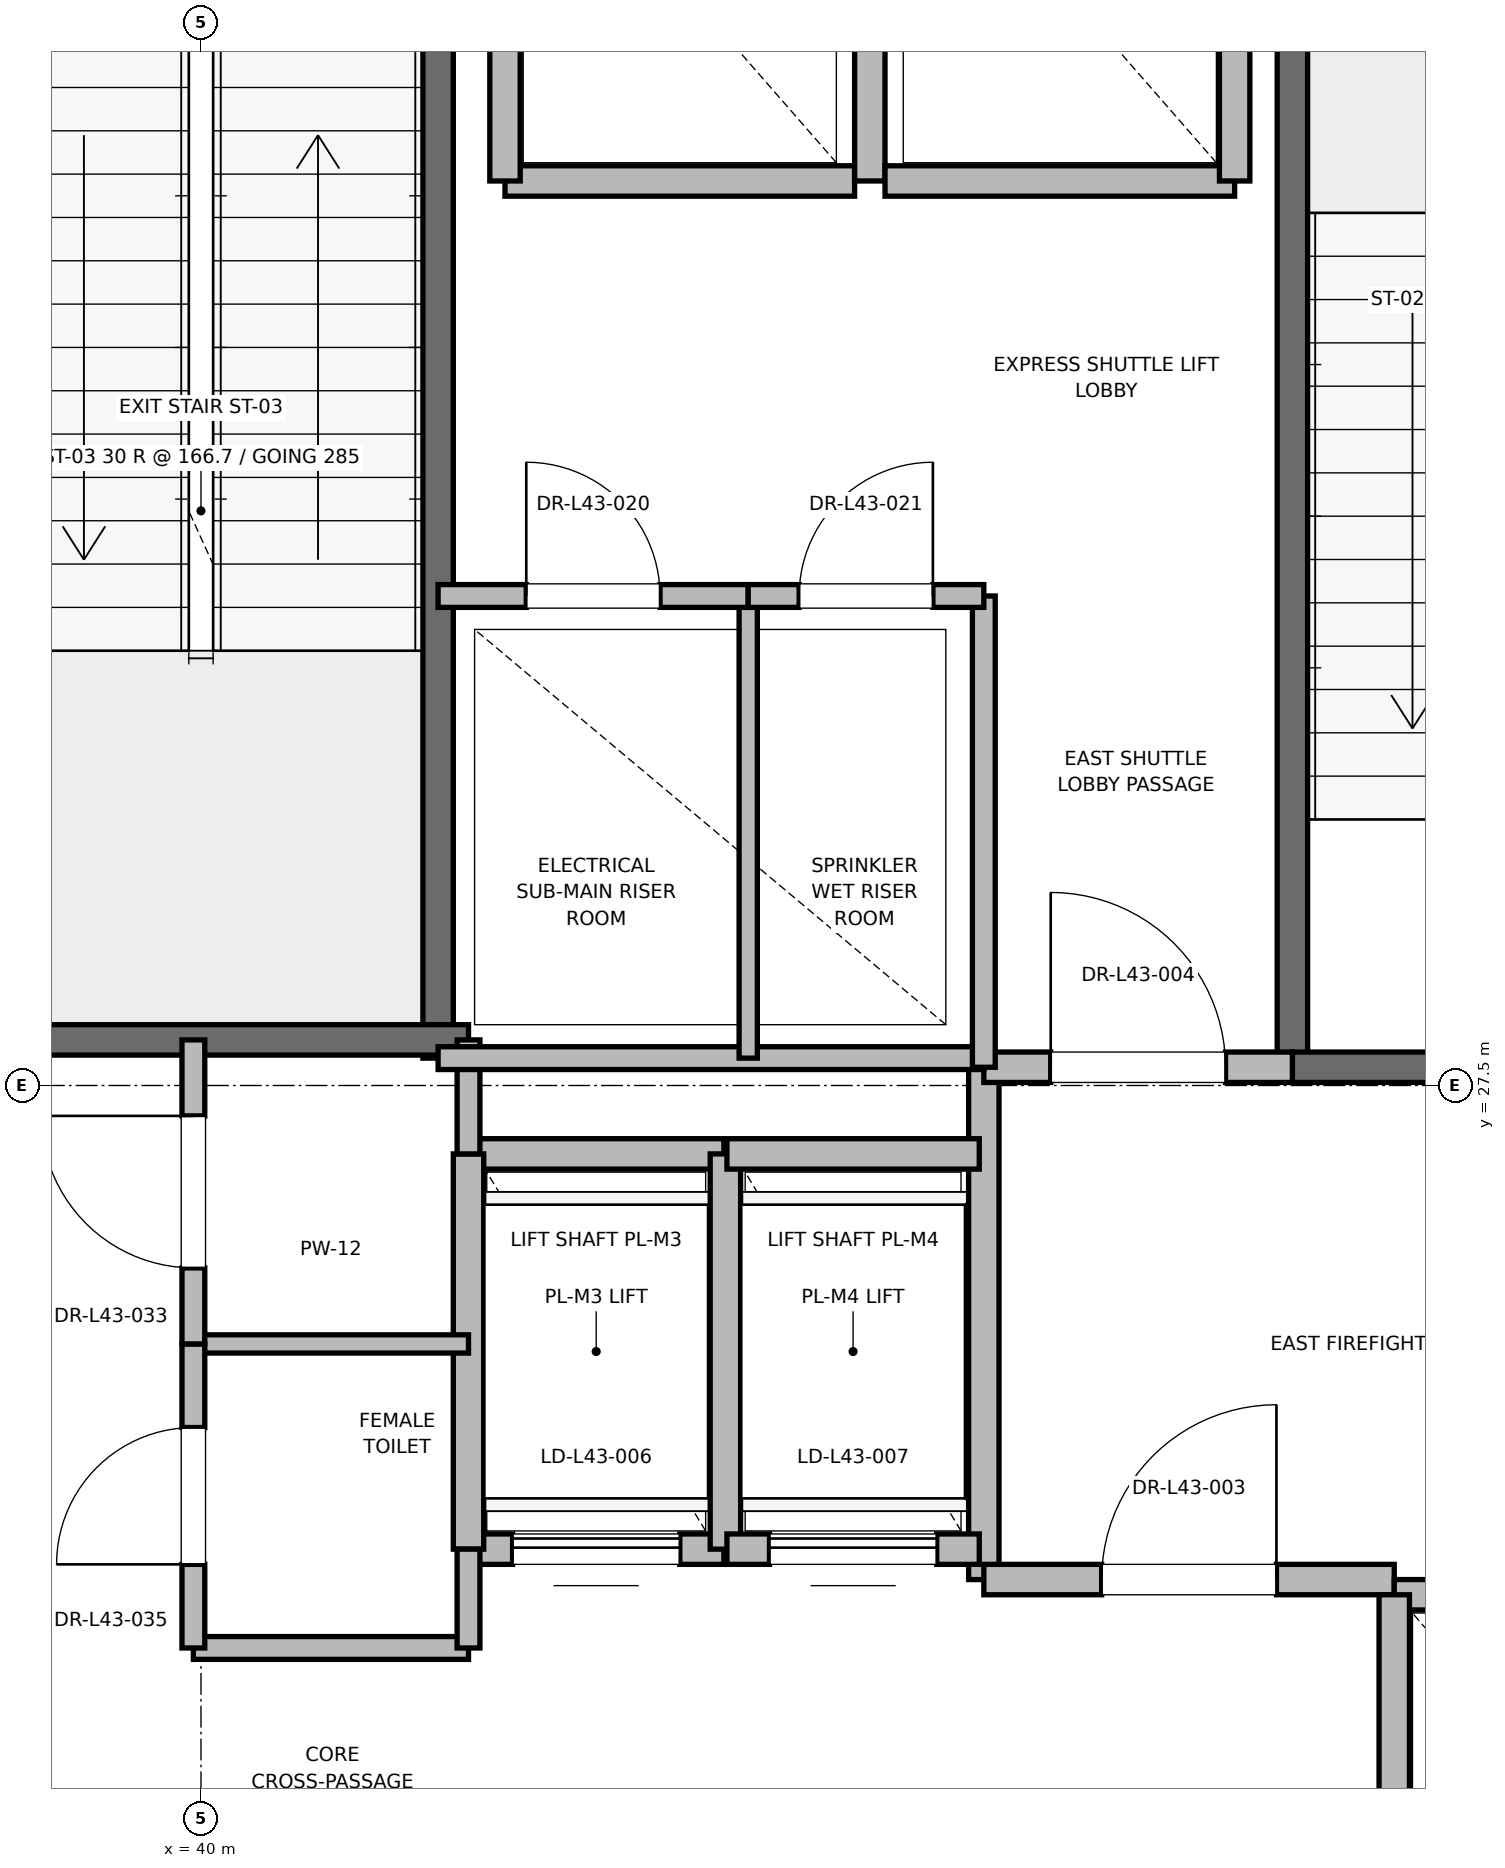
"""IFC4 building model, lengths in metres.
Left out: names, types, materials, properties, quantities, classifications, styles, units other than length and angle.
Written with IfcOpenShell. Run it as: python <this file> out.ifc"""

import sys

from ifc_helpers import new_model, si_unit, direction, frame, frame_2d, origin, place, context, subcontext, project, spatial, rectangle, extrude, element, fill, save


model = new_model("IFC4")
c1 = context("Model", 3, precision=1e-05, world=origin(), true_north=direction((0.0, 1.0)))
c2 = subcontext(c1, "Body", "Model", "MODEL_VIEW")
j1 = project(units=[si_unit("LENGTHUNIT", "METRE"), si_unit("PLANEANGLEUNIT", "RADIAN")], contexts=[c1])
p1 = place(None, origin())
s1 = spatial("IfcSite", under=j1, at=p1, CompositionType="ELEMENT")
p2 = place(p1, origin())
s2 = spatial("IfcBuilding", under=s1, at=p2, CompositionType="ELEMENT")
p3 = place(p2, frame((0.0, 0.0, 184.4)))
s3 = spatial("IfcBuildingStorey", under=s2, at=p3, CompositionType="ELEMENT", Elevation=184.4)
p4 = place(p3, frame((47.18, 27.62, 0.0), z_axis=(0.0, 0.0, 1.0), x_axis=(0.0, 1.0, 0.0)))
e1 = element("IfcWall", 1, at=p4, inside=s3, PredefinedType="SOLIDWALL", context=c2, shape_type="SweptSolid", body=[
    extrude(rectangle(XDim=8.18, YDim=0.2, at=frame_2d((4.09, 0.0))), origin(), (0.0, 0.0, 1.0), 4.7),
])
p5 = place(p3, frame((47.18, 27.62, 0.0), z_axis=(0.0, 0.0, 1.0), x_axis=(1.0, 0.0, 0.0)))
e2 = element("IfcWall", 2, at=p5, inside=s3, PredefinedType="SOLIDWALL", context=c2, shape_type="SweptSolid", body=[
    extrude(rectangle(XDim=3.12, YDim=0.2, at=frame_2d((1.56, 0.0))), origin(), (0.0, 0.0, 1.0), 4.7),
])
p6 = place(p5, frame((1.01, 0.0, 0.0)))
e3 = element("IfcOpeningElement", 3, at=p6, cuts=e2, PredefinedType="OPENING", context=c2, shape_type="SweptSolid", body=[
    extrude(rectangle(XDim=1.1, YDim=2.15, at=frame_2d((0.55, 1.075))), frame((0.0, 0.1, 0.0), z_axis=(0.0, -1.0, 0.0), x_axis=(1.0, 0.0, 0.0)), (0.0, 0.0, 1.0), 0.2),
])
p7 = place(p3, frame((41.56, 27.68, 0.0), z_axis=(0.0, 0.0, 1.0), x_axis=(0.0, 1.0, 0.0)))
e4 = element("IfcWall", 4, at=p7, inside=s3, PredefinedType="SOLIDWALL", context=c2, shape_type="SweptSolid", body=[
    extrude(rectangle(XDim=8.57, YDim=0.2, at=frame_2d((4.285, 0.0))), origin(), (0.0, 0.0, 1.0), 4.7),
])
p8 = place(p3, frame((38.44, 27.8, 0.0), z_axis=(0.0, 0.0, 1.0), x_axis=(1.0, 0.0, 0.0)))
e5 = element("IfcWall", 5, at=p8, inside=s3, PredefinedType="SOLIDWALL", context=c2, shape_type="SweptSolid", body=[
    extrude(rectangle(XDim=3.32, YDim=0.2, at=frame_2d((1.66, 0.0))), origin(), (0.0, 0.0, 1.0), 4.7),
])
p9 = place(p3, frame((45.15, 24.25, 0.0), z_axis=(0.0, 0.0, 1.0), x_axis=(0.0, 1.0, 0.0)))
e6 = element("IfcWall", 6, at=p9, inside=s3, PredefinedType="PARTITIONING", context=c2, shape_type="SweptSolid", body=[
    extrude(rectangle(XDim=3.37, YDim=0.2, at=frame_2d((1.685, 0.0))), origin(), (0.0, 0.0, 1.0), 4.7),
])
p10 = place(p3, frame((45.15, 24.25, 0.0), z_axis=(0.0, 0.0, 1.0), x_axis=(1.0, 0.0, 0.0)))
e7 = element("IfcWall", 7, at=p10, inside=s3, PredefinedType="PARTITIONING", context=c2, shape_type="SweptSolid", body=[
    extrude(rectangle(XDim=2.7, YDim=0.2, at=frame_2d((1.35, 0.0))), origin(), (0.0, 0.0, 1.0), 4.7),
])
p11 = place(p10, frame((0.775, 0.0, 0.0)))
e8 = element("IfcOpeningElement", 8, at=p11, cuts=e7, PredefinedType="OPENING", context=c2, shape_type="SweptSolid", body=[
    extrude(rectangle(XDim=1.15, YDim=2.2, at=frame_2d((0.575, 1.1))), frame((0.0, 0.1, 0.0), z_axis=(0.0, -1.0, 0.0), x_axis=(1.0, 0.0, 0.0)), (0.0, 0.0, 1.0), 0.2),
])
p12 = place(p3, frame((45.15, 27.62, 0.0), z_axis=(0.0, 0.0, 1.0), x_axis=(1.0, 0.0, 0.0)))
e9 = element("IfcWall", 9, at=p12, inside=s3, PredefinedType="PARTITIONING", context=c2, shape_type="SweptSolid", body=[
    extrude(rectangle(XDim=2.03, YDim=0.2, at=frame_2d((1.015, 0.0))), origin(), (0.0, 0.0, 1.0), 4.7),
])
p13 = place(p12, frame((0.44, 0.0, 0.0)))
e10 = element("IfcOpeningElement", 10, at=p13, cuts=e9, PredefinedType="OPENING", context=c2, shape_type="SweptSolid", body=[
    extrude(rectangle(XDim=1.15, YDim=2.2, at=frame_2d((0.575, 1.1))), frame((0.0, 0.1, 0.0), z_axis=(0.0, -1.0, 0.0), x_axis=(1.0, 0.0, 0.0)), (0.0, 0.0, 1.0), 0.2),
])
p14 = place(p3, frame((50.45, 24.15, 0.0), z_axis=(0.0, 0.0, 1.0), x_axis=(-1.0, 0.0, 0.0)))
e11 = element("IfcWall", 11, at=p14, inside=s3, PredefinedType="SOLIDWALL", context=c2, shape_type="SweptSolid", body=[
    extrude(rectangle(XDim=2.6, YDim=0.2, at=frame_2d((1.3, 0.0))), origin(), (0.0, 0.0, 1.0), 3.68),
])
p15 = place(p14, frame((0.75, 0.0, 0.0)))
e12 = element("IfcOpeningElement", 12, at=p15, cuts=e11, PredefinedType="OPENING", context=c2, shape_type="SweptSolid", body=[
    extrude(rectangle(XDim=1.1, YDim=2.2, at=frame_2d((0.55, 1.1))), frame((0.0, 0.1, 0.0), z_axis=(0.0, -1.0, 0.0), x_axis=(1.0, 0.0, 0.0)), (0.0, 0.0, 1.0), 0.2),
])
p16 = place(p3, frame((47.85, 24.15, 0.0), z_axis=(0.0, 0.0, 1.0), x_axis=(0.0, -1.0, 0.0)))
e13 = element("IfcWall", 13, at=p16, inside=s3, PredefinedType="SOLIDWALL", context=c2, shape_type="SweptSolid", body=[
    extrude(rectangle(XDim=3.0, YDim=0.2, at=frame_2d((1.5, 0.0))), origin(), (0.0, 0.0, 1.0), 4.7),
])
p17 = place(p3, frame((41.76, 24.45, 0.0), z_axis=(0.0, 0.0, 1.0), x_axis=(1.0, 0.0, 0.0)))
e14 = element("IfcWall", 14, at=p17, inside=s3, PredefinedType="SOLIDWALL", context=c2, shape_type="SweptSolid", body=[
    extrude(rectangle(XDim=1.68, YDim=0.2, at=frame_2d((0.84, 0.0))), origin(), (0.0, 0.0, 1.0), 4.7),
])
p18 = place(p17, frame((0.29, 0.0, 0.0)))
e15 = element("IfcOpeningElement", 15, at=p18, cuts=e14, PredefinedType="OPENING", context=c2, shape_type="SweptSolid", body=[
    extrude(rectangle(XDim=1.1, YDim=2.2, at=frame_2d((0.55, 1.1))), frame((0.0, 0.1, 0.0), z_axis=(0.0, -1.0, 0.0), x_axis=(1.0, 0.0, 0.0)), (0.0, 0.0, 1.0), 0.2),
])
p19 = place(p3, frame((43.44, 27.05, 0.0), z_axis=(0.0, 0.0, 1.0), x_axis=(-1.0, 0.0, 0.0)))
e16 = element("IfcWall", 16, at=p19, inside=s3, PredefinedType="SOLIDWALL", context=c2, shape_type="SweptSolid", body=[
    extrude(rectangle(XDim=1.68, YDim=0.2, at=frame_2d((0.84, 0.0))), origin(), (0.0, 0.0, 1.0), 4.7),
])
for number, where, z_axis, x_axis in (
    (17, (41.76, 27.05, 0.0), (0.0, 0.0, 1.0), (0.0, -1.0, 0.0)),
    (18, (43.45, 24.45, 0.0), (0.0, 0.0, 1.0), (0.0, 1.0, 0.0)),
):
    element("IfcWall", number, at=place(p3, frame(where, z_axis=z_axis, x_axis=x_axis)), inside=s3, PredefinedType="SOLIDWALL", context=c2, shape_type="SweptSolid", body=[
        extrude(rectangle(XDim=2.6, YDim=0.2, at=frame_2d((1.3, 0.0))), origin(), (0.0, 0.0, 1.0), 4.7),
    ])
p20 = place(p3, frame((43.46, 24.45, 0.0), z_axis=(0.0, 0.0, 1.0), x_axis=(1.0, 0.0, 0.0)))
e19 = element("IfcWall", 19, at=p20, inside=s3, PredefinedType="SOLIDWALL", context=c2, shape_type="SweptSolid", body=[
    extrude(rectangle(XDim=1.66, YDim=0.2, at=frame_2d((0.83, 0.0))), origin(), (0.0, 0.0, 1.0), 4.7),
])
p21 = place(p20, frame((0.28, 0.0, 0.0)))
e20 = element("IfcOpeningElement", 20, at=p21, cuts=e19, PredefinedType="OPENING", context=c2, shape_type="SweptSolid", body=[
    extrude(rectangle(XDim=1.1, YDim=2.2, at=frame_2d((0.55, 1.1))), frame((0.0, 0.1, 0.0), z_axis=(0.0, -1.0, 0.0), x_axis=(1.0, 0.0, 0.0)), (0.0, 0.0, 1.0), 0.2),
])
p22 = place(p3, frame((45.12, 27.05, 0.0), z_axis=(0.0, 0.0, 1.0), x_axis=(-1.0, 0.0, 0.0)))
e21 = element("IfcWall", 21, at=p22, inside=s3, PredefinedType="SOLIDWALL", context=c2, shape_type="SweptSolid", body=[
    extrude(rectangle(XDim=1.66, YDim=0.2, at=frame_2d((0.83, 0.0))), origin(), (0.0, 0.0, 1.0), 4.7),
])
p23 = place(p3, frame((42.0, 33.45, 0.0), z_axis=(0.0, 0.0, 1.0), x_axis=(1.0, 0.0, 0.0)))
e22 = element("IfcWall", 22, at=p23, inside=s3, PredefinedType="SOLIDWALL", context=c2, shape_type="SweptSolid", body=[
    extrude(rectangle(XDim=2.3, YDim=0.2, at=frame_2d((1.15, 0.0))), origin(), (0.0, 0.0, 1.0), 4.7),
])
for number, where, z_axis, x_axis in (
    (23, (42.0, 36.05, 0.0), (0.0, 0.0, 1.0), (0.0, -1.0, 0.0)),
    (24, (44.4, 33.45, 0.0), (0.0, 0.0, 1.0), (0.0, 1.0, 0.0)),
):
    element("IfcWall", number, at=place(p3, frame(where, z_axis=z_axis, x_axis=x_axis)), inside=s3, PredefinedType="SOLIDWALL", context=c2, shape_type="SweptSolid", body=[
        extrude(rectangle(XDim=2.6, YDim=0.2, at=frame_2d((1.3, 0.0))), origin(), (0.0, 0.0, 1.0), 3.68),
    ])
p24 = place(p3, frame((44.5, 33.45, 0.0), z_axis=(0.0, 0.0, 1.0), x_axis=(1.0, 0.0, 0.0)))
e25 = element("IfcWall", 25, at=p24, inside=s3, PredefinedType="SOLIDWALL", context=c2, shape_type="SweptSolid", body=[
    extrude(rectangle(XDim=2.3, YDim=0.2, at=frame_2d((1.15, 0.0))), origin(), (0.0, 0.0, 1.0), 4.7),
])
p25 = place(p3, frame((46.8, 33.45, 0.0), z_axis=(0.0, 0.0, 1.0), x_axis=(0.0, 1.0, 0.0)))
e26 = element("IfcWall", 26, at=p25, inside=s3, PredefinedType="SOLIDWALL", context=c2, shape_type="SweptSolid", body=[
    extrude(rectangle(XDim=2.6, YDim=0.2, at=frame_2d((1.3, 0.0))), origin(), (0.0, 0.0, 1.0), 4.7),
])
p26 = place(p3, frame((39.95, 23.8, 0.0), z_axis=(0.0, 0.0, 1.0), x_axis=(1.0, 0.0, 0.0)))
e27 = element("IfcWall", 27, at=p26, inside=s3, PredefinedType="PARTITIONING", context=c2, shape_type="SweptSolid", body=[
    extrude(rectangle(XDim=1.81, YDim=0.15, at=frame_2d((0.905, 0.0))), origin(), (0.0, 0.0, 1.0), 2.85),
])
p27 = place(p3, frame((39.95, 25.8, 0.0), z_axis=(0.0, 0.0, 1.0), x_axis=(1.0, 0.0, 0.0)))
e28 = element("IfcWall", 28, at=p27, inside=s3, PredefinedType="PARTITIONING", context=c2, shape_type="SweptSolid", body=[
    extrude(rectangle(XDim=1.81, YDim=0.12, at=frame_2d((0.905, 0.0))), origin(), (0.0, 0.0, 1.0), 2.85),
])
p28 = place(p3, frame((41.76, 23.8, 0.0), z_axis=(0.0, 0.0, 1.0), x_axis=(0.0, 1.0, 0.0)))
e29 = element("IfcWall", 29, at=p28, inside=s3, PredefinedType="PARTITIONING", context=c2, shape_type="SweptSolid", body=[
    extrude(rectangle(XDim=0.65, YDim=0.15, at=frame_2d((0.325, 0.0))), origin(), (0.0, 0.0, 1.0), 2.85),
])
p29 = place(p3, frame((41.76, 27.05, 0.0), z_axis=(0.0, 0.0, 1.0), x_axis=(0.0, 1.0, 0.0)))
e30 = element("IfcWall", 30, at=p29, inside=s3, PredefinedType="PARTITIONING", context=c2, shape_type="SweptSolid", body=[
    extrude(rectangle(XDim=0.75, YDim=0.15, at=frame_2d((0.375, 0.0))), origin(), (0.0, 0.0, 1.0), 2.85),
])
p30 = place(p3, frame((39.95, 23.8, 0.0), z_axis=(0.0, 0.0, 1.0), x_axis=(0.0, 1.0, 0.0)))
e31 = element("IfcWall", 31, at=p30, inside=s3, PredefinedType="PARTITIONING", context=c2, shape_type="SweptSolid", body=[
    extrude(rectangle(XDim=2.0, YDim=0.15, at=frame_2d((1.0, 0.0))), origin(), (0.0, 0.0, 1.0), 2.85),
])
p31 = place(p30, frame((0.55, 0.0, 0.0)))
e32 = element("IfcOpeningElement", 32, at=p31, cuts=e31, PredefinedType="OPENING", context=c2, shape_type="SweptSolid", body=[
    extrude(rectangle(XDim=0.9, YDim=2.1, at=frame_2d((0.45, 1.05))), frame((0.0, 0.075, 0.0), z_axis=(0.0, -1.0, 0.0), x_axis=(1.0, 0.0, 0.0)), (0.0, 0.0, 1.0), 0.15),
])
p32 = place(p3, frame((39.95, 25.8, 0.0), z_axis=(0.0, 0.0, 1.0), x_axis=(0.0, 1.0, 0.0)))
e33 = element("IfcWall", 33, at=p32, inside=s3, PredefinedType="PARTITIONING", context=c2, shape_type="SweptSolid", body=[
    extrude(rectangle(XDim=2.0, YDim=0.15, at=frame_2d((1.0, 0.0))), origin(), (0.0, 0.0, 1.0), 2.85),
])
p33 = place(p32, frame((0.5, 0.0, 0.0)))
e34 = element("IfcOpeningElement", 34, at=p33, cuts=e33, PredefinedType="OPENING", context=c2, shape_type="SweptSolid", body=[
    extrude(rectangle(XDim=1.0, YDim=2.15, at=frame_2d((0.5, 1.075))), frame((0.0, 0.075, 0.0), z_axis=(0.0, -1.0, 0.0), x_axis=(1.0, 0.0, 0.0)), (0.0, 0.0, 1.0), 0.15),
])
p34 = place(p3, frame((41.56, 27.68, 0.0), z_axis=(0.0, 0.0, 1.0), x_axis=(1.0, 0.0, 0.0)))
e35 = element("IfcWall", 35, at=p34, inside=s3, PredefinedType="PARTITIONING", context=c2, shape_type="SweptSolid", body=[
    extrude(rectangle(XDim=3.59, YDim=0.15, at=frame_2d((1.795, 0.0))), origin(), (0.0, 0.0, 1.0), 2.85),
])
p35 = place(p3, frame((45.15, 27.62, 0.0), z_axis=(0.0, 0.0, 1.0), x_axis=(0.0, 1.0, 0.0)))
e36 = element("IfcWall", 36, at=p35, inside=s3, PredefinedType="PARTITIONING", context=c2, shape_type="SweptSolid", body=[
    extrude(rectangle(XDim=3.1, YDim=0.15, at=frame_2d((1.55, 0.0))), origin(), (0.0, 0.0, 1.0), 2.85),
])
p36 = place(p3, frame((43.6, 27.68, 0.0), z_axis=(0.0, 0.0, 1.0), x_axis=(0.0, 1.0, 0.0)))
e37 = element("IfcWall", 37, at=p36, inside=s3, PredefinedType="PARTITIONING", context=c2, shape_type="SweptSolid", body=[
    extrude(rectangle(XDim=3.04, YDim=0.12, at=frame_2d((1.52, 0.0))), origin(), (0.0, 0.0, 1.0), 2.85),
])
p37 = place(p3, frame((41.56, 30.72, 0.0), z_axis=(0.0, 0.0, 1.0), x_axis=(1.0, 0.0, 0.0)))
e38 = element("IfcWall", 38, at=p37, inside=s3, PredefinedType="PARTITIONING", context=c2, shape_type="SweptSolid", body=[
    extrude(rectangle(XDim=2.04, YDim=0.15, at=frame_2d((1.02, 0.0))), origin(), (0.0, 0.0, 1.0), 2.85),
])
p38 = place(p37, frame((0.58, 0.0, 0.0)))
e39 = element("IfcOpeningElement", 39, at=p38, cuts=e38, PredefinedType="OPENING", context=c2, shape_type="SweptSolid", body=[
    extrude(rectangle(XDim=0.88, YDim=2.1, at=frame_2d((0.44, 1.05))), frame((0.0, 0.075, 0.0), z_axis=(0.0, -1.0, 0.0), x_axis=(1.0, 0.0, 0.0)), (0.0, 0.0, 1.0), 0.15),
])
p39 = place(p3, frame((43.6, 30.72, 0.0), z_axis=(0.0, 0.0, 1.0), x_axis=(1.0, 0.0, 0.0)))
e40 = element("IfcWall", 40, at=p39, inside=s3, PredefinedType="PARTITIONING", context=c2, shape_type="SweptSolid", body=[
    extrude(rectangle(XDim=1.55, YDim=0.15, at=frame_2d((0.775, 0.0))), origin(), (0.0, 0.0, 1.0), 2.85),
])
p40 = place(p39, frame((0.335, 0.0, 0.0)))
e41 = element("IfcOpeningElement", 41, at=p40, cuts=e40, PredefinedType="OPENING", context=c2, shape_type="SweptSolid", body=[
    extrude(rectangle(XDim=0.88, YDim=2.1, at=frame_2d((0.44, 1.05))), frame((0.0, 0.075, 0.0), z_axis=(0.0, -1.0, 0.0), x_axis=(1.0, 0.0, 0.0)), (0.0, 0.0, 1.0), 0.15),
])
p41 = place(p11, origin())
e42 = element("IfcDoor", 42, at=p41, inside=s3, OperationType="SINGLE_SWING_RIGHT", PredefinedType="DOOR", context=c2, shape_type="SweptSolid", body=[
    extrude(rectangle(XDim=1.15, YDim=2.2, at=frame_2d((0.575, 1.1))), frame((0.0, 0.025, 0.0), z_axis=(0.0, -1.0, 0.0), x_axis=(1.0, 0.0, 0.0)), (0.0, 0.0, 1.0), 0.05),
])
fill(e8, e42)
p42 = place(p13, origin())
e43 = element("IfcDoor", 43, at=p42, inside=s3, OperationType="SINGLE_SWING_LEFT", PredefinedType="DOOR", context=c2, shape_type="SweptSolid", body=[
    extrude(rectangle(XDim=1.15, YDim=2.2, at=frame_2d((0.575, 1.1))), frame((0.0, 0.025, 0.0), z_axis=(0.0, -1.0, 0.0), x_axis=(1.0, 0.0, 0.0)), (0.0, 0.0, 1.0), 0.05),
])
fill(e10, e43)
p43 = place(p18, origin())
e44 = element("IfcDoor", 44, at=p43, inside=s3, OperationType="SLIDING_TO_RIGHT", PredefinedType="DOOR", context=c2, shape_type="SweptSolid", body=[
    extrude(rectangle(XDim=1.1, YDim=2.2, at=frame_2d((0.55, 1.1))), frame((0.0, 0.025, 0.0), z_axis=(0.0, -1.0, 0.0), x_axis=(1.0, 0.0, 0.0)), (0.0, 0.0, 1.0), 0.05),
])
fill(e15, e44)
p44 = place(p21, origin())
e45 = element("IfcDoor", 45, at=p44, inside=s3, OperationType="SLIDING_TO_RIGHT", PredefinedType="DOOR", context=c2, shape_type="SweptSolid", body=[
    extrude(rectangle(XDim=1.1, YDim=2.2, at=frame_2d((0.55, 1.1))), frame((0.0, 0.025, 0.0), z_axis=(0.0, -1.0, 0.0), x_axis=(1.0, 0.0, 0.0)), (0.0, 0.0, 1.0), 0.05),
])
fill(e20, e45)
p45 = place(p31, origin())
e46 = element("IfcDoor", 46, at=p45, inside=s3, OperationType="SINGLE_SWING_LEFT", PredefinedType="DOOR", context=c2, shape_type="SweptSolid", body=[
    extrude(rectangle(XDim=0.9, YDim=2.1, at=frame_2d((0.45, 1.05))), frame((0.0, 0.025, 0.0), z_axis=(0.0, -1.0, 0.0), x_axis=(1.0, 0.0, 0.0)), (0.0, 0.0, 1.0), 0.05),
])
fill(e32, e46)
p46 = place(p33, origin())
e47 = element("IfcDoor", 47, at=p46, inside=s3, OperationType="SINGLE_SWING_RIGHT", PredefinedType="DOOR", context=c2, shape_type="SweptSolid", body=[
    extrude(rectangle(XDim=1.0, YDim=2.15, at=frame_2d((0.5, 1.075))), frame((0.0, 0.025, 0.0), z_axis=(0.0, -1.0, 0.0), x_axis=(1.0, 0.0, 0.0)), (0.0, 0.0, 1.0), 0.05),
])
fill(e34, e47)
p47 = place(p38, origin())
e48 = element("IfcDoor", 48, at=p47, inside=s3, OperationType="SINGLE_SWING_LEFT", PredefinedType="DOOR", context=c2, shape_type="SweptSolid", body=[
    extrude(rectangle(XDim=0.88, YDim=2.1, at=frame_2d((0.44, 1.05))), frame((0.0, 0.025, 0.0), z_axis=(0.0, -1.0, 0.0), x_axis=(1.0, 0.0, 0.0)), (0.0, 0.0, 1.0), 0.05),
])
fill(e39, e48)
p48 = place(p40, origin())
e49 = element("IfcDoor", 49, at=p48, inside=s3, OperationType="SINGLE_SWING_RIGHT", PredefinedType="DOOR", context=c2, shape_type="SweptSolid", body=[
    extrude(rectangle(XDim=0.88, YDim=2.1, at=frame_2d((0.44, 1.05))), frame((0.0, 0.025, 0.0), z_axis=(0.0, -1.0, 0.0), x_axis=(1.0, 0.0, 0.0)), (0.0, 0.0, 1.0), 0.05),
])
fill(e41, e49)
save(model, sys.argv[1])
